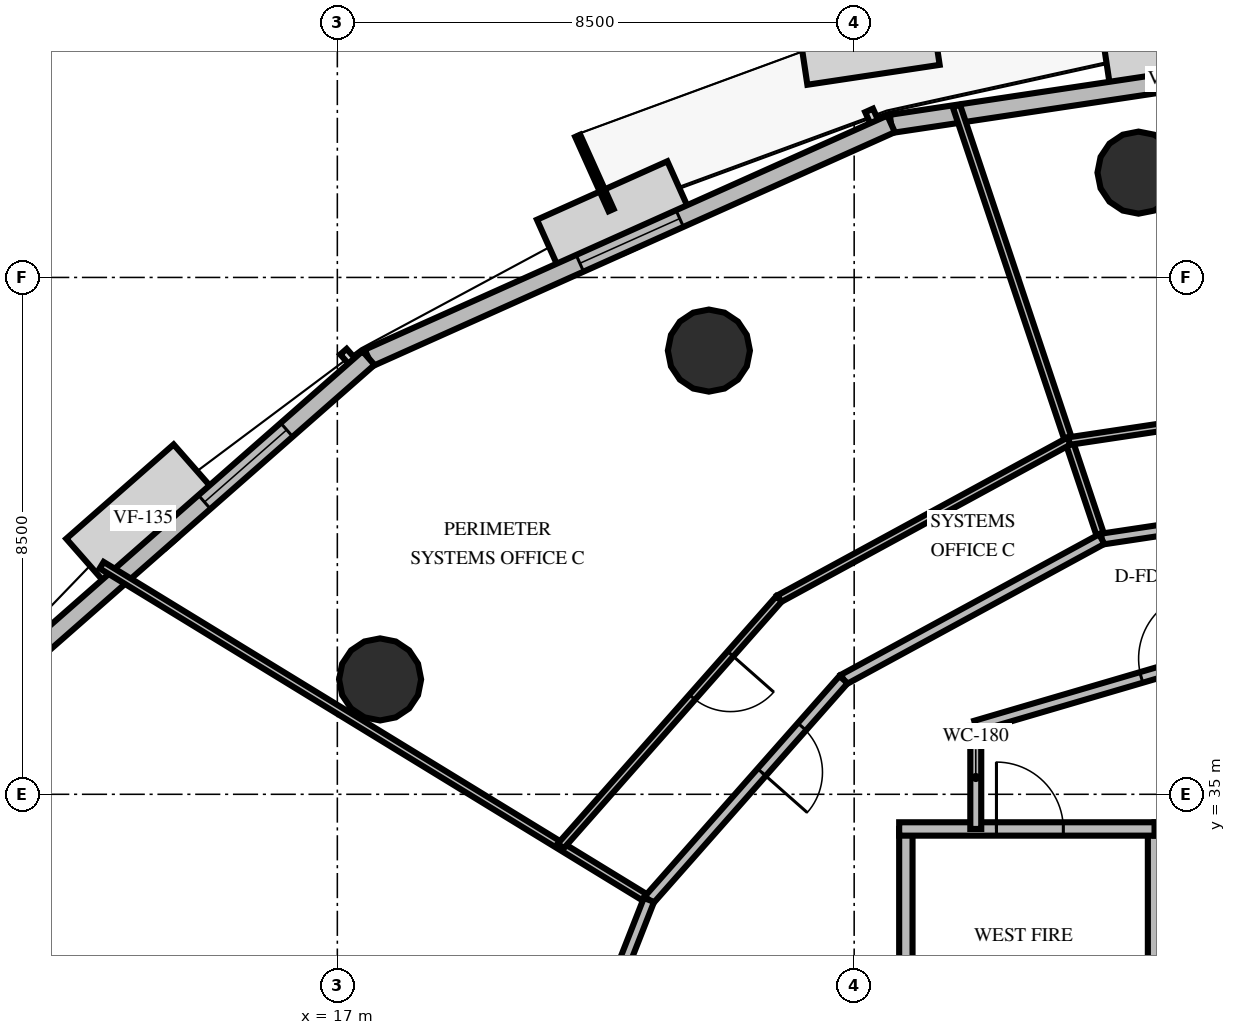
"""IFC4 building model, lengths in metres.
Left out: names, types, materials, properties, quantities, classifications, styles, units other than length and angle.
Written with IfcOpenShell. Run it as: python <this file> out.ifc"""

import sys

from ifc_helpers import new_model, si_unit, direction, frame, frame_2d, origin, origin_2d, place, context, subcontext, project, spatial, rectangle, circle, extrude, element, fill, save


model = new_model("IFC4")
c1 = context("Model", 3, precision=1e-05, world=origin(), true_north=direction((0.0, 1.0)))
c2 = subcontext(c1, "Body", "Model", "MODEL_VIEW")
j1 = project(units=[si_unit("LENGTHUNIT", "METRE"), si_unit("PLANEANGLEUNIT", "RADIAN")], contexts=[c1])
p1 = place(None, origin())
s1 = spatial("IfcSite", under=j1, at=p1, CompositionType="ELEMENT")
p2 = place(p1, origin())
s2 = spatial("IfcBuilding", under=s1, at=p2, CompositionType="ELEMENT")
p3 = place(p2, frame((0.0, 0.0, 67.8)))
s3 = spatial("IfcBuildingStorey", under=s2, at=p3, CompositionType="ELEMENT", Elevation=67.8)
for number, where, z_axis, x_axis in (
    (1, (30.176, 45.223, 0.0), (0.0, 0.0, 1.0), (1.0, 0.0, 0.0)),
    (2, (23.111, 42.297, 0.0), (0.0, 0.0, 1.0), (1.0, 0.0, 0.0)),
    (3, (17.703, 36.889, 0.0), (0.0, 0.0, 1.0), (1.0, 0.0, 0.0)),
):
    element("IfcColumn", number, at=place(p3, frame(where, z_axis=z_axis, x_axis=x_axis)), inside=s3, PredefinedType="COLUMN", context=c2, shape_type="SweptSolid", body=[
        extrude(circle(Radius=0.675, at=origin_2d()), origin(), (0.0, 0.0, 1.0), 4.2),
    ])
p4 = place(p3, frame((35.655, 47.461, 0.0), z_axis=(0.0, 0.0, 1.0), x_axis=(-0.988888262402, -0.148660702551, 0.0)))
e4 = element("IfcWall", 4, at=p4, inside=s3, PredefinedType="SOLIDWALL", context=c2, shape_type="SweptSolid", body=[
    extrude(rectangle(XDim=9.655, YDim=0.3, at=frame_2d((4.827, 0.0))), origin(), (0.0, 0.0, 1.0), 3.0),
])
p5 = place(p4, frame((1.15, 0.0, 0.0)))
e5 = element("IfcOpeningElement", 5, at=p5, cuts=e4, PredefinedType="OPENING", context=c2, shape_type="SweptSolid", body=[
    extrude(rectangle(XDim=1.05, YDim=2.15, at=frame_2d((0.525, 1.075))), frame((0.0, 0.16, 0.0), z_axis=(0.0, -1.0, 0.0), x_axis=(1.0, 0.0, 0.0)), (0.0, 0.0, 1.0), 0.32),
])
p6 = place(p3, frame((26.108, 46.026, 0.0), z_axis=(0.0, 0.0, 1.0), x_axis=(-0.912605050972, -0.408842293484, 0.0)))
e6 = element("IfcWall", 6, at=p6, inside=s3, PredefinedType="SOLIDWALL", context=c2, shape_type="SweptSolid", body=[
    extrude(rectangle(XDim=9.419, YDim=0.3, at=frame_2d((4.709, 0.0))), origin(), (0.0, 0.0, 1.0), 3.0),
])
p7 = place(p6, frame((3.809, 0.0, 0.8)))
e7 = element("IfcOpeningElement", 7, at=p7, cuts=e6, PredefinedType="OPENING", context=c2, shape_type="SweptSolid", body=[
    extrude(rectangle(XDim=1.8, YDim=1.95, at=frame_2d((0.9, 0.975))), frame((0.0, 0.16, 0.0), z_axis=(0.0, -1.0, 0.0), x_axis=(1.0, 0.0, 0.0)), (0.0, 0.0, 1.0), 0.32),
])
p8 = place(p3, frame((17.512, 42.175, 0.0), z_axis=(0.0, 0.0, 1.0), x_axis=(-0.751409333496, -0.659836353603, 0.0)))
e8 = element("IfcWall", 8, at=p8, inside=s3, PredefinedType="SOLIDWALL", context=c2, shape_type="SweptSolid", body=[
    extrude(rectangle(XDim=8.793, YDim=0.3, at=frame_2d((4.396, 0.0))), origin(), (0.0, 0.0, 1.0), 3.0),
])
p9 = place(p8, frame((1.79, 0.0, 0.8)))
e9 = element("IfcOpeningElement", 9, at=p9, cuts=e8, PredefinedType="OPENING", context=c2, shape_type="SweptSolid", body=[
    extrude(rectangle(XDim=1.8, YDim=1.95, at=frame_2d((0.9, 0.975))), frame((0.0, 0.16, 0.0), z_axis=(0.0, -1.0, 0.0), x_axis=(1.0, 0.0, 0.0)), (0.0, 0.0, 1.0), 0.32),
])
p10 = place(p3, frame((26.35, 30.05, 0.0), z_axis=(0.0, 0.0, 1.0), x_axis=(0.0, 1.0, 0.0)))
e10 = element("IfcWall", 10, at=p10, inside=s3, PredefinedType="SOLIDWALL", context=c2, shape_type="SweptSolid", body=[
    extrude(rectangle(XDim=4.38, YDim=0.22, at=frame_2d((2.19, 0.0))), origin(), (0.0, 0.0, 1.0), 3.0),
])
p11 = place(p3, frame((30.44, 30.05, 0.0), z_axis=(0.0, 0.0, 1.0), x_axis=(0.0, 1.0, 0.0)))
e11 = element("IfcWall", 11, at=p11, inside=s3, PredefinedType="SOLIDWALL", context=c2, shape_type="SweptSolid", body=[
    extrude(rectangle(XDim=4.38, YDim=0.22, at=frame_2d((2.19, 0.0))), origin(), (0.0, 0.0, 1.0), 3.0),
])
p12 = place(p11, frame((0.8, 0.0, 0.0)))
e12 = element("IfcOpeningElement", 12, at=p12, cuts=e11, PredefinedType="OPENING", context=c2, shape_type="SweptSolid", body=[
    extrude(rectangle(XDim=1.05, YDim=2.1, at=frame_2d((0.525, 1.05))), frame((0.0, 0.12, 0.0), z_axis=(0.0, -1.0, 0.0), x_axis=(1.0, 0.0, 0.0)), (0.0, 0.0, 1.0), 0.24),
])
p13 = place(p3, frame((26.24, 34.43, 0.0), z_axis=(0.0, 0.0, 1.0), x_axis=(1.0, 0.0, 0.0)))
e13 = element("IfcWall", 13, at=p13, inside=s3, PredefinedType="SOLIDWALL", context=c2, shape_type="SweptSolid", body=[
    extrude(rectangle(XDim=4.31, YDim=0.22, at=frame_2d((2.155, 0.0))), origin(), (0.0, 0.0, 1.0), 3.0),
])
p14 = place(p13, frame((1.6, 0.0, 0.0)))
e14 = element("IfcOpeningElement", 14, at=p14, cuts=e13, PredefinedType="OPENING", context=c2, shape_type="SweptSolid", body=[
    extrude(rectangle(XDim=1.1, YDim=2.15, at=frame_2d((0.55, 1.075))), frame((0.0, 0.12, 0.0), z_axis=(0.0, -1.0, 0.0), x_axis=(1.0, 0.0, 0.0)), (0.0, 0.0, 1.0), 0.24),
])
p15 = place(p3, frame((30.44, 34.43, 0.0), z_axis=(0.0, 0.0, 1.0), x_axis=(1.0, 0.0, 0.0)))
e15 = element("IfcWall", 15, at=p15, inside=s3, PredefinedType="SOLIDWALL", context=c2, shape_type="SweptSolid", body=[
    extrude(rectangle(XDim=7.12, YDim=0.22, at=frame_2d((3.56, 0.0))), origin(), (0.0, 0.0, 1.0), 3.0),
])
p16 = place(p15, frame((3.01, 0.0, 0.0)))
e16 = element("IfcOpeningElement", 16, at=p16, cuts=e15, PredefinedType="OPENING", context=c2, shape_type="SweptSolid", body=[
    extrude(rectangle(XDim=1.1, YDim=2.15, at=frame_2d((0.55, 1.075))), frame((0.0, 0.12, 0.0), z_axis=(0.0, -1.0, 0.0), x_axis=(1.0, 0.0, 0.0)), (0.0, 0.0, 1.0), 0.24),
])
p17 = place(p3, frame((27.5, 34.43, 0.0), z_axis=(0.0, 0.0, 1.0), x_axis=(0.0, 1.0, 0.0)))
e17 = element("IfcWall", 17, at=p17, inside=s3, PredefinedType="PARTITIONING", context=c2, shape_type="SweptSolid", body=[
    extrude(rectangle(XDim=1.693, YDim=0.18, at=frame_2d((0.846, 0.0))), origin(), (0.0, 0.0, 1.0), 3.0),
])
p18 = place(p3, frame((27.5, 36.123, 0.0), z_axis=(0.0, 0.0, 1.0), x_axis=(0.959546654541, 0.281549671923, 0.0)))
e18 = element("IfcWall", 18, at=p18, inside=s3, PredefinedType="PARTITIONING", context=c2, shape_type="SweptSolid", body=[
    extrude(rectangle(XDim=6.774, YDim=0.18, at=frame_2d((3.387, 0.0))), origin(), (0.0, 0.0, 1.0), 3.0),
])
p19 = place(p18, frame((2.837, 0.0, 0.0)))
e19 = element("IfcOpeningElement", 19, at=p19, cuts=e18, PredefinedType="OPENING", context=c2, shape_type="SweptSolid", body=[
    extrude(rectangle(XDim=1.1, YDim=2.15, at=frame_2d((0.55, 1.075))), frame((0.0, 0.1, 0.0), z_axis=(0.0, -1.0, 0.0), x_axis=(1.0, 0.0, 0.0)), (0.0, 0.0, 1.0), 0.2),
])
p20 = place(p3, frame((29.572, 39.197, 0.0), z_axis=(0.0, 0.0, 1.0), x_axis=(-0.318127905721, 0.948047802382, 0.0)))
e20 = element("IfcWall", 20, at=p20, inside=s3, PredefinedType="PARTITIONING", context=c2, shape_type="SweptSolid", body=[
    extrude(rectangle(XDim=7.514, YDim=0.125, at=frame_2d((3.757, 0.0))), origin(), (0.0, 0.0, 1.0), 3.0),
])
p21 = place(p3, frame((34.352, 39.916, 0.0), z_axis=(0.0, 0.0, 1.0), x_axis=(-0.988886662028, -0.14867134782, 0.0)))
e21 = element("IfcWall", 21, at=p21, inside=s3, PredefinedType="PARTITIONING", context=c2, shape_type="SweptSolid", body=[
    extrude(rectangle(XDim=4.834, YDim=0.18, at=frame_2d((2.417, 0.0))), origin(), (0.0, 0.0, 1.0), 3.0),
])
p22 = place(p21, frame((1.034, 0.0, 0.0)))
e22 = element("IfcOpeningElement", 22, at=p22, cuts=e21, PredefinedType="OPENING", context=c2, shape_type="SweptSolid", body=[
    extrude(rectangle(XDim=1.0, YDim=2.15, at=frame_2d((0.5, 1.075))), frame((0.0, 0.1, 0.0), z_axis=(0.0, -1.0, 0.0), x_axis=(1.0, 0.0, 0.0)), (0.0, 0.0, 1.0), 0.2),
])
p23 = place(p3, frame((34.395, 41.615, 0.0), z_axis=(0.0, 0.0, 1.0), x_axis=(-0.988889758913, -0.148650747449, 0.0)))
e23 = element("IfcWall", 23, at=p23, inside=s3, PredefinedType="PARTITIONING", context=c2, shape_type="SweptSolid", body=[
    extrude(rectangle(XDim=5.425, YDim=0.125, at=frame_2d((2.712, 0.0))), origin(), (0.0, 0.0, 1.0), 3.0),
])
p24 = place(p23, frame((1.209, 0.0, 0.0)))
e24 = element("IfcOpeningElement", 24, at=p24, cuts=e23, PredefinedType="OPENING", context=c2, shape_type="SweptSolid", body=[
    extrude(rectangle(XDim=0.95, YDim=2.15, at=frame_2d((0.475, 1.075))), frame((0.0, 0.073, 0.0), z_axis=(0.0, -1.0, 0.0), x_axis=(1.0, 0.0, 0.0)), (0.0, 0.0, 1.0), 0.145),
])
p25 = place(p3, frame((22.125, 33.263, 0.0), z_axis=(0.0, 0.0, 1.0), x_axis=(-0.853088436917, 0.521766345023, 0.0)))
e25 = element("IfcWall", 25, at=p25, inside=s3, PredefinedType="PARTITIONING", context=c2, shape_type="SweptSolid", body=[
    extrude(rectangle(XDim=10.551, YDim=0.125, at=frame_2d((5.275, 0.0))), origin(), (0.0, 0.0, 1.0), 3.0),
])
p26 = place(p3, frame((29.572, 39.197, 0.0), z_axis=(0.0, 0.0, 1.0), x_axis=(-0.878385338365, -0.477953133001, 0.0)))
e26 = element("IfcWall", 26, at=p26, inside=s3, PredefinedType="PARTITIONING", context=c2, shape_type="SweptSolid", body=[
    extrude(rectangle(XDim=4.834, YDim=0.18, at=frame_2d((2.417, 0.0))), origin(), (0.0, 0.0, 1.0), 3.0),
])
p27 = place(p3, frame((25.325, 36.886, 0.0), z_axis=(0.0, 0.0, 1.0), x_axis=(-0.661965641577, -0.74953418159, 0.0)))
e27 = element("IfcWall", 27, at=p27, inside=s3, PredefinedType="PARTITIONING", context=c2, shape_type="SweptSolid", body=[
    extrude(rectangle(XDim=4.834, YDim=0.18, at=frame_2d((2.417, 0.0))), origin(), (0.0, 0.0, 1.0), 3.0),
])
p28 = place(p27, frame((1.034, 0.0, 0.0)))
e28 = element("IfcOpeningElement", 28, at=p28, cuts=e27, PredefinedType="OPENING", context=c2, shape_type="SweptSolid", body=[
    extrude(rectangle(XDim=1.0, YDim=2.15, at=frame_2d((0.5, 1.075))), frame((0.0, 0.1, 0.0), z_axis=(0.0, -1.0, 0.0), x_axis=(1.0, 0.0, 0.0)), (0.0, 0.0, 1.0), 0.2),
])
p29 = place(p3, frame((29.031, 40.809, 0.0), z_axis=(0.0, 0.0, 1.0), x_axis=(-0.878390435216, -0.477943765857, 0.0)))
e29 = element("IfcWall", 29, at=p29, inside=s3, PredefinedType="PARTITIONING", context=c2, shape_type="SweptSolid", body=[
    extrude(rectangle(XDim=5.425, YDim=0.125, at=frame_2d((2.712, 0.0))), origin(), (0.0, 0.0, 1.0), 3.0),
])
p30 = place(p3, frame((24.266, 38.216, 0.0), z_axis=(0.0, 0.0, 1.0), x_axis=(-0.661983266299, -0.749518615606, 0.0)))
e30 = element("IfcWall", 30, at=p30, inside=s3, PredefinedType="PARTITIONING", context=c2, shape_type="SweptSolid", body=[
    extrude(rectangle(XDim=5.425, YDim=0.125, at=frame_2d((2.712, 0.0))), origin(), (0.0, 0.0, 1.0), 3.0),
])
p31 = place(p30, frame((1.209, 0.0, 0.0)))
e31 = element("IfcOpeningElement", 31, at=p31, cuts=e30, PredefinedType="OPENING", context=c2, shape_type="SweptSolid", body=[
    extrude(rectangle(XDim=0.95, YDim=2.15, at=frame_2d((0.475, 1.075))), frame((0.0, 0.073, 0.0), z_axis=(0.0, -1.0, 0.0), x_axis=(1.0, 0.0, 0.0)), (0.0, 0.0, 1.0), 0.145),
])
p32 = place(p3, frame((22.125, 33.263, 0.0), z_axis=(0.0, 0.0, 1.0), x_axis=(-0.365724243793, -0.930723255056, 0.0)))
e32 = element("IfcWall", 32, at=p32, inside=s3, PredefinedType="PARTITIONING", context=c2, shape_type="SweptSolid", body=[
    extrude(rectangle(XDim=4.834, YDim=0.18, at=frame_2d((2.417, 0.0))), origin(), (0.0, 0.0, 1.0), 3.0),
])
p33 = place(p32, frame((1.917, 0.0, 0.0)))
e33 = element("IfcOpeningElement", 33, at=p33, cuts=e32, PredefinedType="OPENING", context=c2, shape_type="SweptSolid", body=[
    extrude(rectangle(XDim=1.0, YDim=2.15, at=frame_2d((0.5, 1.075))), frame((0.0, 0.1, 0.0), z_axis=(0.0, -1.0, 0.0), x_axis=(1.0, 0.0, 0.0)), (0.0, 0.0, 1.0), 0.2),
])
p34 = place(p7, origin())
e34 = element("IfcWindow", 34, at=p34, inside=s3, PartitioningType="SINGLE_PANEL", PredefinedType="WINDOW", context=c2, shape_type="SweptSolid", body=[
    extrude(rectangle(XDim=1.8, YDim=1.95, at=frame_2d((0.9, 0.975))), frame((0.0, 0.03, 0.0), z_axis=(0.0, -1.0, 0.0), x_axis=(1.0, 0.0, 0.0)), (0.0, 0.0, 1.0), 0.06),
])
fill(e7, e34)
p35 = place(p9, origin())
e35 = element("IfcWindow", 35, at=p35, inside=s3, PartitioningType="SINGLE_PANEL", PredefinedType="WINDOW", context=c2, shape_type="SweptSolid", body=[
    extrude(rectangle(XDim=1.8, YDim=1.95, at=frame_2d((0.9, 0.975))), frame((0.0, 0.03, 0.0), z_axis=(0.0, -1.0, 0.0), x_axis=(1.0, 0.0, 0.0)), (0.0, 0.0, 1.0), 0.06),
])
fill(e9, e35)
p36 = place(p14, origin())
e36 = element("IfcDoor", 36, at=p36, inside=s3, OperationType="SINGLE_SWING_LEFT", PredefinedType="DOOR", context=c2, shape_type="SweptSolid", body=[
    extrude(rectangle(XDim=1.1, YDim=2.15, at=frame_2d((0.55, 1.075))), frame((0.0, 0.025, 0.0), z_axis=(0.0, -1.0, 0.0), x_axis=(1.0, 0.0, 0.0)), (0.0, 0.0, 1.0), 0.05),
])
fill(e14, e36)
p37 = place(p19, origin())
e37 = element("IfcDoor", 37, at=p37, inside=s3, OperationType="SINGLE_SWING_RIGHT", PredefinedType="DOOR", context=c2, shape_type="SweptSolid", body=[
    extrude(rectangle(XDim=1.1, YDim=2.15, at=frame_2d((0.55, 1.075))), frame((0.0, 0.025, 0.0), z_axis=(0.0, -1.0, 0.0), x_axis=(1.0, 0.0, 0.0)), (0.0, 0.0, 1.0), 0.05),
])
fill(e19, e37)
p38 = place(p28, origin())
e38 = element("IfcDoor", 38, at=p38, inside=s3, OperationType="SINGLE_SWING_RIGHT", PredefinedType="DOOR", context=c2, shape_type="SweptSolid", body=[
    extrude(rectangle(XDim=1.0, YDim=2.15, at=frame_2d((0.5, 1.075))), frame((0.0, 0.025, 0.0), z_axis=(0.0, -1.0, 0.0), x_axis=(1.0, 0.0, 0.0)), (0.0, 0.0, 1.0), 0.05),
])
fill(e28, e38)
p39 = place(p31, origin())
e39 = element("IfcDoor", 39, at=p39, inside=s3, OperationType="SINGLE_SWING_LEFT", PredefinedType="DOOR", context=c2, shape_type="SweptSolid", body=[
    extrude(rectangle(XDim=0.95, YDim=2.15, at=frame_2d((0.475, 1.075))), frame((0.0, 0.025, 0.0), z_axis=(0.0, -1.0, 0.0), x_axis=(1.0, 0.0, 0.0)), (0.0, 0.0, 1.0), 0.05),
])
fill(e31, e39)
save(model, sys.argv[1])
